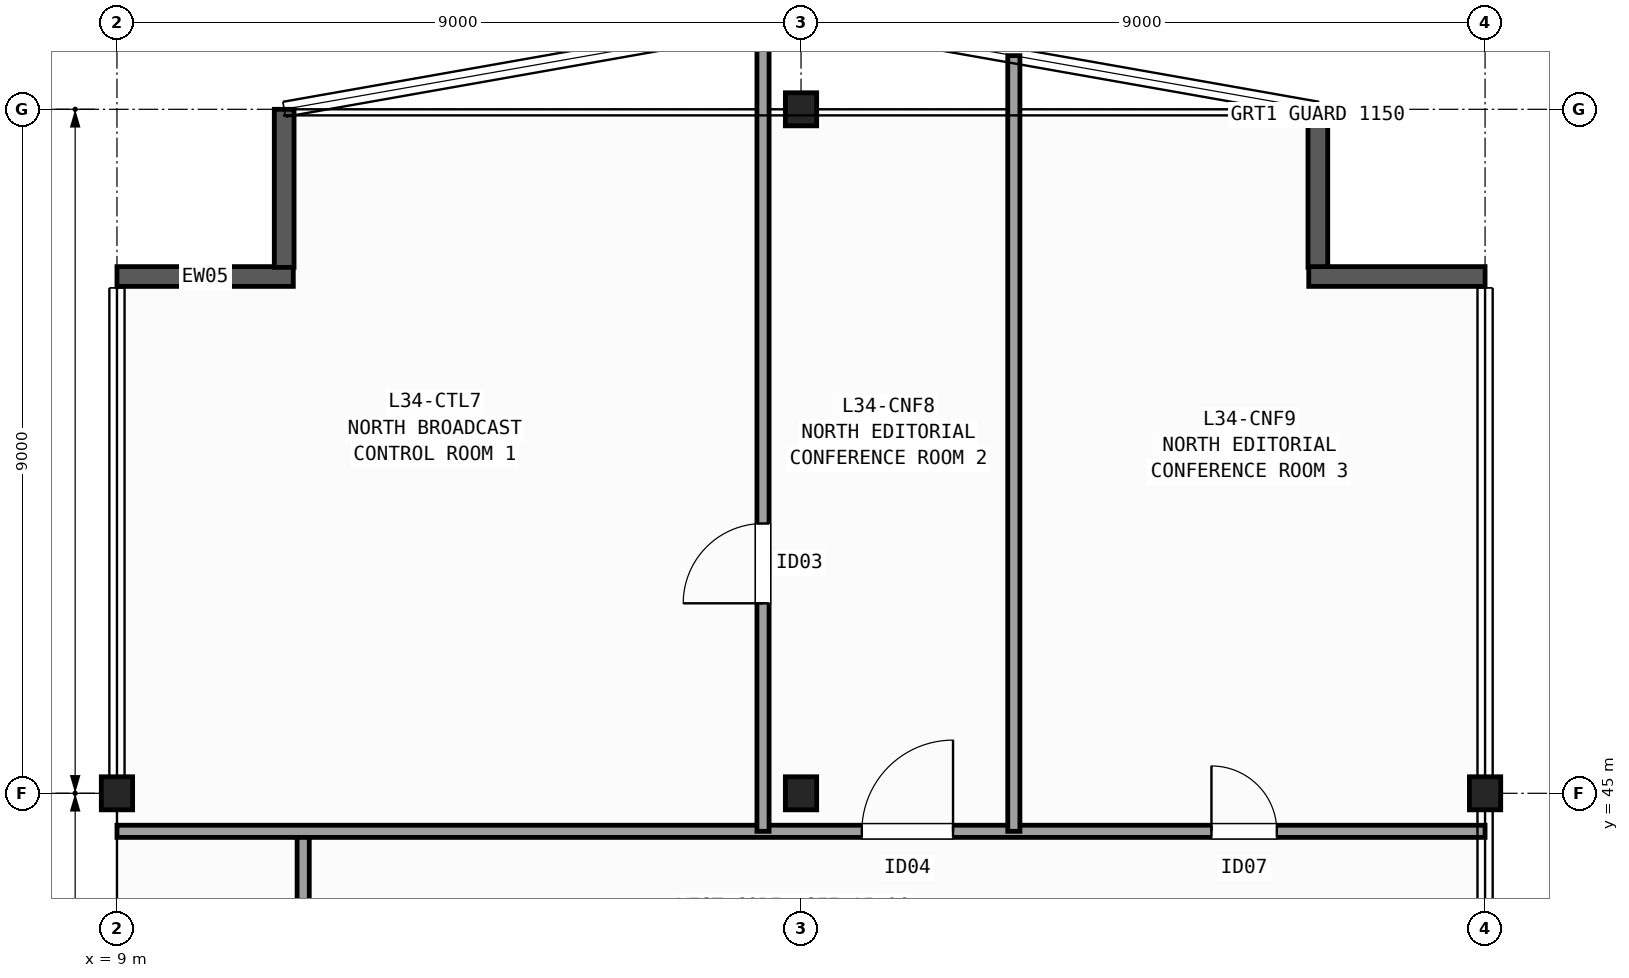
"""IFC4 building model, lengths in metres.
Left out: names, types, materials, properties, quantities, classifications, styles, units other than length and angle.
Written with IfcOpenShell. Run it as: python <this file> out.ifc"""

import sys

from ifc_helpers import new_model, si_unit, direction, frame, frame_2d, origin, origin_2d, place, context, subcontext, project, spatial, rectangle, i_section, extrude, element, fill, save


model = new_model("IFC4")
c1 = context("Model", 3, precision=1e-05, world=origin(), true_north=direction((0.0, 1.0)))
c2 = subcontext(c1, "Body", "Model", "MODEL_VIEW")
j1 = project(units=[si_unit("LENGTHUNIT", "METRE"), si_unit("PLANEANGLEUNIT", "RADIAN")], contexts=[c1])
p1 = place(None, origin())
s1 = spatial("IfcSite", under=j1, at=p1, CompositionType="ELEMENT")
p2 = place(p1, origin())
s2 = spatial("IfcBuilding", under=s1, at=p2, CompositionType="ELEMENT")
p3 = place(p2, frame((0.0, 0.0, 139.6)))
s3 = spatial("IfcBuildingStorey", under=s2, at=p3, CompositionType="ELEMENT", Elevation=139.6)
for number, where, z_axis, x_axis in (
    (1, (9.0, 45.0, 0.0), (0.0, 0.0, 1.0), (1.0, 0.0, 0.0)),
    (2, (18.0, 45.0, 0.0), (0.0, 0.0, 1.0), (1.0, 0.0, 0.0)),
    (3, (18.0, 54.0, 0.0), (0.0, 0.0, 1.0), (1.0, 0.0, 0.0)),
    (4, (27.0, 45.0, 0.0), (0.0, 0.0, 1.0), (1.0, 0.0, 0.0)),
):
    element("IfcColumn", number, at=place(p3, frame(where, z_axis=z_axis, x_axis=x_axis)), inside=s3, PredefinedType="COLUMN", context=c2, shape_type="SweptSolid", body=[
        extrude(i_section(OverallWidth=0.412, OverallDepth=0.435, WebThickness=0.036, FlangeThickness=0.057, FilletRadius=0.015, at=origin_2d()), origin(), (0.0, 0.0, 1.0), 3.7),
    ])
p4 = place(p3, frame((9.0, 51.8, 0.0), z_axis=(0.0, 0.0, 1.0), x_axis=(1.0, 0.0, 0.0)))
e5 = element("IfcWall", 5, at=p4, inside=s3, PredefinedType="SOLIDWALL", context=c2, shape_type="SweptSolid", body=[
    extrude(rectangle(XDim=2.32, YDim=0.26, at=frame_2d((1.16, 0.0))), origin(), (0.0, 0.0, 1.0), 3.42),
])
for number, where, z_axis, x_axis in (
    (6, (11.2, 51.92, 0.0), (0.0, 0.0, 1.0), (0.0, 1.0, 0.0)),
    (7, (24.8, 54.0, 0.0), (0.0, 0.0, 1.0), (0.0, -1.0, 0.0)),
):
    element("IfcWall", number, at=place(p3, frame(where, z_axis=z_axis, x_axis=x_axis)), inside=s3, PredefinedType="SOLIDWALL", context=c2, shape_type="SweptSolid", body=[
        extrude(rectangle(XDim=2.08, YDim=0.26, at=frame_2d((1.04, 0.0))), origin(), (0.0, 0.0, 1.0), 3.42),
    ])
p5 = place(p3, frame((24.68, 51.8, 0.0), z_axis=(0.0, 0.0, 1.0), x_axis=(1.0, 0.0, 0.0)))
e8 = element("IfcWall", 8, at=p5, inside=s3, PredefinedType="SOLIDWALL", context=c2, shape_type="SweptSolid", body=[
    extrude(rectangle(XDim=2.32, YDim=0.26, at=frame_2d((1.16, 0.0))), origin(), (0.0, 0.0, 1.0), 3.42),
])
p6 = place(p3, frame((11.45, 42.4, 0.0), z_axis=(0.0, 0.0, 1.0), x_axis=(0.0, 1.0, 0.0)))
e9 = element("IfcWall", 9, at=p6, inside=s3, PredefinedType="PARTITIONING", context=c2, shape_type="SweptSolid", body=[
    extrude(rectangle(XDim=2.1, YDim=0.16, at=frame_2d((1.05, 0.0))), origin(), (0.0, 0.0, 1.0), 3.42),
])
p7 = place(p3, frame((9.0, 44.5, 0.0), z_axis=(0.0, 0.0, 1.0), x_axis=(1.0, 0.0, 0.0)))
e10 = element("IfcWall", 10, at=p7, inside=s3, PredefinedType="PARTITIONING", context=c2, shape_type="SweptSolid", body=[
    extrude(rectangle(XDim=18.0, YDim=0.16, at=frame_2d((9.0, 0.0))), origin(), (0.0, 0.0, 1.0), 2.634),
])
p8 = place(p7, frame((9.8, 0.0, 0.0)))
e11 = element("IfcOpeningElement", 11, at=p8, cuts=e10, PredefinedType="OPENING", context=c2, shape_type="SweptSolid", body=[
    extrude(rectangle(XDim=1.2, YDim=2.15, at=frame_2d((0.6, 1.075))), frame((0.0, 0.09, 0.0), z_axis=(0.0, -1.0, 0.0), x_axis=(1.0, 0.0, 0.0)), (0.0, 0.0, 1.0), 0.18),
])
p9 = place(p7, frame((14.4, 0.0, 0.0)))
e12 = element("IfcOpeningElement", 12, at=p9, cuts=e10, PredefinedType="OPENING", context=c2, shape_type="SweptSolid", body=[
    extrude(rectangle(XDim=0.86, YDim=2.05, at=frame_2d((0.43, 1.025))), frame((0.0, 0.09, 0.0), z_axis=(0.0, -1.0, 0.0), x_axis=(1.0, 0.0, 0.0)), (0.0, 0.0, 1.0), 0.18),
])
p10 = place(p3, frame((17.5, 44.5, 0.0), z_axis=(0.0, 0.0, 1.0), x_axis=(0.0, 1.0, 0.0)))
e13 = element("IfcWall", 13, at=p10, inside=s3, PredefinedType="PARTITIONING", context=c2, shape_type="SweptSolid", body=[
    extrude(rectangle(XDim=10.612, YDim=0.16, at=frame_2d((5.306, 0.0))), origin(), (0.0, 0.0, 1.0), 3.42),
])
p11 = place(p10, frame((3.0, 0.0, 0.0)))
e14 = element("IfcOpeningElement", 14, at=p11, cuts=e13, PredefinedType="OPENING", context=c2, shape_type="SweptSolid", body=[
    extrude(rectangle(XDim=1.05, YDim=2.15, at=frame_2d((0.525, 1.075))), frame((0.0, 0.09, 0.0), z_axis=(0.0, -1.0, 0.0), x_axis=(1.0, 0.0, 0.0)), (0.0, 0.0, 1.0), 0.18),
])
p12 = place(p3, frame((20.8, 44.5, 0.0), z_axis=(0.0, 0.0, 1.0), x_axis=(0.0, 1.0, 0.0)))
e15 = element("IfcWall", 15, at=p12, inside=s3, PredefinedType="PARTITIONING", context=c2, shape_type="SweptSolid", body=[
    extrude(rectangle(XDim=10.206, YDim=0.16, at=frame_2d((5.103, 0.0))), origin(), (0.0, 0.0, 1.0), 3.42),
])
p13 = place(p11, origin())
e16 = element("IfcDoor", 16, at=p13, inside=s3, OperationType="SINGLE_SWING_LEFT", PredefinedType="DOOR", context=c2, shape_type="SweptSolid", body=[
    extrude(rectangle(XDim=1.05, YDim=2.15, at=frame_2d((0.525, 1.075))), frame((0.0, 0.025, 0.0), z_axis=(0.0, -1.0, 0.0), x_axis=(1.0, 0.0, 0.0)), (0.0, 0.0, 1.0), 0.05),
])
fill(e14, e16)
p14 = place(p8, origin())
e17 = element("IfcDoor", 17, at=p14, inside=s3, OperationType="SINGLE_SWING_RIGHT", PredefinedType="DOOR", context=c2, shape_type="SweptSolid", body=[
    extrude(rectangle(XDim=1.2, YDim=2.15, at=frame_2d((0.6, 1.075))), frame((0.0, 0.025, 0.0), z_axis=(0.0, -1.0, 0.0), x_axis=(1.0, 0.0, 0.0)), (0.0, 0.0, 1.0), 0.05),
])
fill(e11, e17)
p15 = place(p9, origin())
e18 = element("IfcDoor", 18, at=p15, inside=s3, OperationType="SINGLE_SWING_LEFT", PredefinedType="DOOR", context=c2, shape_type="SweptSolid", body=[
    extrude(rectangle(XDim=0.86, YDim=2.05, at=frame_2d((0.43, 1.025))), frame((0.0, 0.025, 0.0), z_axis=(0.0, -1.0, 0.0), x_axis=(1.0, 0.0, 0.0)), (0.0, 0.0, 1.0), 0.05),
])
fill(e12, e18)
save(model, sys.argv[1])
